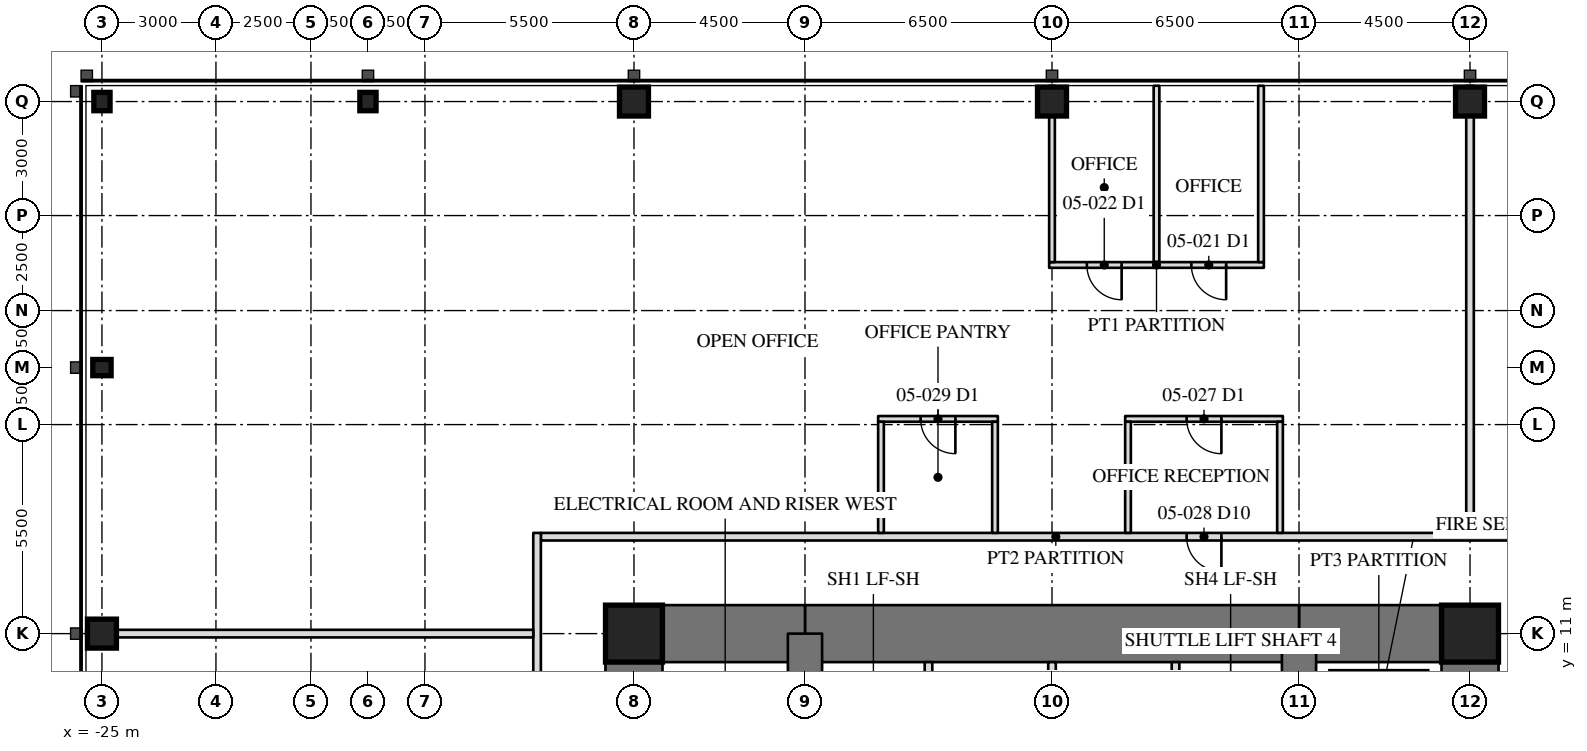
"""IFC4 building model, lengths in metres.
Left out: names, types, materials, properties, quantities, classifications, styles, units other than length and angle.
Written with IfcOpenShell. Run it as: python <this file> out.ifc"""

import sys

from ifc_helpers import new_model, si_unit, direction, frame, frame_2d, origin, origin_2d, place, context, subcontext, project, spatial, rectangle, hollow_rectangle, i_section, extrude, element, fill, save


model = new_model("IFC4")
c1 = context("Model", 3, precision=1e-05, world=origin(), true_north=direction((0.0, 1.0)))
c2 = subcontext(c1, "Body", "Model", "MODEL_VIEW")
j1 = project(units=[si_unit("LENGTHUNIT", "METRE"), si_unit("PLANEANGLEUNIT", "RADIAN")], contexts=[c1])
p1 = place(None, origin())
s1 = spatial("IfcSite", under=j1, at=p1, CompositionType="ELEMENT")
p2 = place(p1, origin())
s2 = spatial("IfcBuilding", under=s1, at=p2, CompositionType="ELEMENT")
p3 = place(p2, frame((0.0, 0.0, 24.2)))
s3 = spatial("IfcBuildingStorey", under=s2, at=p3, CompositionType="ELEMENT", Elevation=24.2)
for number, where, z_axis, x_axis in (
    (1, (11.0, 25.0, 0.0), (0.0, 0.0, 1.0), (1.0, 0.0, 0.0)),
    (2, (0.0, 25.0, 0.0), (0.0, 0.0, 1.0), (1.0, 0.0, 0.0)),
    (3, (-11.0, 25.0, 0.0), (0.0, 0.0, 1.0), (1.0, 0.0, 0.0)),
):
    element("IfcColumn", number, at=place(p3, frame(where, z_axis=z_axis, x_axis=x_axis)), inside=s3, PredefinedType="COLUMN", context=c2, shape_type="SweptSolid", body=[
        extrude(hollow_rectangle(XDim=0.762, YDim=0.762, WallThickness=0.127, at=origin_2d()), origin(), (0.0, 0.0, 1.0), 4.1),
    ])
for number, where, z_axis, x_axis in (
    (4, (-18.0, 25.0, 0.0), (0.0, 0.0, 1.0), (1.0, 0.0, 0.0)),
    (5, (-25.0, 25.0, 0.0), (0.0, 0.0, 1.0), (1.0, 0.0, 0.0)),
    (6, (-25.0, 18.0, 0.0), (0.0, 0.0, 1.0), (0.0, 1.0, 0.0)),
):
    element("IfcColumn", number, at=place(p3, frame(where, z_axis=z_axis, x_axis=x_axis)), inside=s3, PredefinedType="COLUMN", context=c2, shape_type="SweptSolid", body=[
        extrude(i_section(OverallWidth=0.427, OverallDepth=0.483, WebThickness=0.051, FlangeThickness=0.082, at=origin_2d()), origin(), (0.0, 0.0, 1.0), 4.1),
    ])
p4 = place(p3, frame((-25.0, 11.0, 0.0), z_axis=(0.0, 0.0, 1.0), x_axis=(0.0, 1.0, 0.0)))
e7 = element("IfcColumn", 7, at=p4, inside=s3, PredefinedType="COLUMN", context=c2, shape_type="SweptSolid", body=[
    extrude(hollow_rectangle(XDim=0.762, YDim=0.762, WallThickness=0.127, at=origin_2d()), origin(), (0.0, 0.0, 1.0), 4.1),
])
p5 = place(p3, frame((11.0, -11.0, 0.0), z_axis=(0.0, 0.0, 1.0), x_axis=(0.0, 1.0, 0.0)))
e8 = element("IfcWall", 8, at=p5, inside=s3, PredefinedType="SHEAR", context=c2, shape_type="SweptSolid", body=[
    extrude(rectangle(XDim=22.0, YDim=1.5, at=frame_2d((11.0, 0.0))), origin(), (0.0, 0.0, 1.0), 4.1),
])
p6 = place(p5, frame((15.393, 0.0, 0.0)))
e9 = element("IfcOpeningElement", 9, at=p6, cuts=e8, PredefinedType="OPENING", context=c2, shape_type="SweptSolid", body=[
    extrude(rectangle(XDim=0.915, YDim=2.134, at=frame_2d((0.458, 1.067))), frame((0.0, 0.76, 0.0), z_axis=(0.0, -1.0, 0.0), x_axis=(1.0, 0.0, 0.0)), (0.0, 0.0, 1.0), 1.52),
])
p7 = place(p3, frame((-11.0, 11.0, 0.0), z_axis=(0.0, 0.0, 1.0), x_axis=(0.0, -1.0, 0.0)))
e10 = element("IfcWall", 10, at=p7, inside=s3, PredefinedType="SHEAR", context=c2, shape_type="SweptSolid", body=[
    extrude(rectangle(XDim=22.0, YDim=1.5, at=frame_2d((11.0, 0.0))), origin(), (0.0, 0.0, 1.0), 4.1),
])
p8 = place(p7, frame((15.393, 0.0, 0.0)))
e11 = element("IfcOpeningElement", 11, at=p8, cuts=e10, PredefinedType="OPENING", context=c2, shape_type="SweptSolid", body=[
    extrude(rectangle(XDim=0.915, YDim=2.134, at=frame_2d((0.458, 1.067))), frame((0.0, 0.76, 0.0), z_axis=(0.0, -1.0, 0.0), x_axis=(1.0, 0.0, 0.0)), (0.0, 0.0, 1.0), 1.52),
])
p9 = place(p3, frame((11.0, 11.0, 0.0), z_axis=(0.0, 0.0, 1.0), x_axis=(-1.0, 0.0, 0.0)))
e12 = element("IfcWall", 12, at=p9, inside=s3, PredefinedType="SHEAR", context=c2, shape_type="SweptSolid", body=[
    extrude(rectangle(XDim=4.5, YDim=1.5, at=frame_2d((2.25, 0.0))), origin(), (0.0, 0.0, 1.0), 4.1),
])
p10 = place(p3, frame((6.5, 11.0, 0.0), z_axis=(0.0, 0.0, 1.0), x_axis=(-1.0, 0.0, 0.0)))
e13 = element("IfcWall", 13, at=p10, inside=s3, PredefinedType="SHEAR", context=c2, shape_type="SweptSolid", body=[
    extrude(rectangle(XDim=13.0, YDim=1.5, at=frame_2d((6.5, 0.0))), origin(), (0.0, 0.0, 1.0), 4.1),
])
p11 = place(p3, frame((-6.5, 11.0, 0.0), z_axis=(0.0, 0.0, 1.0), x_axis=(-1.0, 0.0, 0.0)))
e14 = element("IfcWall", 14, at=p11, inside=s3, PredefinedType="SHEAR", context=c2, shape_type="SweptSolid", body=[
    extrude(rectangle(XDim=4.5, YDim=1.5, at=frame_2d((2.25, 0.0))), origin(), (0.0, 0.0, 1.0), 4.1),
])
for number, where, z_axis, x_axis in (
    (15, (6.5, 6.5, 0.0), (0.0, 0.0, 1.0), (0.0, 1.0, 0.0)),
    (16, (-6.5, 11.0, 0.0), (0.0, 0.0, 1.0), (0.0, -1.0, 0.0)),
):
    element("IfcWall", number, at=place(p3, frame(where, z_axis=z_axis, x_axis=x_axis)), inside=s3, PredefinedType="SHEAR", context=c2, shape_type="SweptSolid", body=[
        extrude(rectangle(XDim=4.5, YDim=0.9, at=frame_2d((2.25, 0.0))), origin(), (0.0, 0.0, 1.0), 4.1),
    ])
for number, where, z_axis, x_axis in (
    (17, (11.0, 11.0, 0.0), (0.0, 0.0, 1.0), (1.0, 0.0, 0.0)),
    (18, (-11.0, 11.0, 0.0), (0.0, 0.0, 1.0), (1.0, 0.0, 0.0)),
):
    element("IfcColumn", number, at=place(p3, frame(where, z_axis=z_axis, x_axis=x_axis)), inside=s3, PredefinedType="COLUMN", context=c2, shape_type="SweptSolid", body=[
        extrude(hollow_rectangle(XDim=1.499, YDim=1.499, WallThickness=0.102, at=origin_2d()), origin(), (0.0, 0.0, 1.0), 4.1),
    ])
for number, where, z_axis, x_axis in (
    (19, (-3.25, 6.95, 0.0), (0.0, 0.0, 1.0), (0.0, 1.0, 0.0)),
    (20, (0.0, 6.95, 0.0), (0.0, 0.0, 1.0), (0.0, 1.0, 0.0)),
    (21, (3.25, 6.95, 0.0), (0.0, 0.0, 1.0), (0.0, 1.0, 0.0)),
):
    element("IfcWall", number, at=place(p3, frame(where, z_axis=z_axis, x_axis=x_axis)), inside=s3, PredefinedType="PARTITIONING", context=c2, shape_type="SweptSolid", body=[
        extrude(rectangle(XDim=3.3, YDim=0.2, at=frame_2d((1.65, 0.0))), origin(), (0.0, 0.0, 1.0), 3.91),
    ])
p12 = place(p3, frame((13.65, 13.55, 0.0), z_axis=(0.0, 0.0, 1.0), x_axis=(-1.0, 0.0, 0.0)))
e22 = element("IfcWall", 22, at=p12, inside=s3, PredefinedType="PARTITIONING", context=c2, shape_type="SweptSolid", body=[
    extrude(rectangle(XDim=27.1, YDim=0.2, at=frame_2d((13.55, 0.0))), origin(), (0.0, 0.0, 1.0), 3.91),
])
p13 = place(p12, frame((9.192, 0.0, 0.0)))
e23 = element("IfcOpeningElement", 23, at=p13, cuts=e22, PredefinedType="OPENING", context=c2, shape_type="SweptSolid", body=[
    extrude(rectangle(XDim=0.915, YDim=2.134, at=frame_2d((0.458, 1.067))), frame((0.0, 0.11, 0.0), z_axis=(0.0, -1.0, 0.0), x_axis=(1.0, 0.0, 0.0)), (0.0, 0.0, 1.0), 0.22),
])
p14 = place(p3, frame((-13.55, 13.65, 0.0), z_axis=(0.0, 0.0, 1.0), x_axis=(0.0, -1.0, 0.0)))
e24 = element("IfcWall", 24, at=p14, inside=s3, PredefinedType="PARTITIONING", context=c2, shape_type="SweptSolid", body=[
    extrude(rectangle(XDim=27.1, YDim=0.2, at=frame_2d((13.55, 0.0))), origin(), (0.0, 0.0, 1.0), 3.91),
])
p15 = place(p14, frame((6.192, 0.0, 0.0)))
e25 = element("IfcOpeningElement", 25, at=p15, cuts=e24, PredefinedType="OPENING", context=c2, shape_type="SweptSolid", body=[
    extrude(rectangle(XDim=0.915, YDim=2.134, at=frame_2d((0.458, 1.067))), frame((0.0, 0.11, 0.0), z_axis=(0.0, -1.0, 0.0), x_axis=(1.0, 0.0, 0.0)), (0.0, 0.0, 1.0), 0.22),
])
for number, where, z_axis, x_axis in (
    (26, (11.0, 13.65, 0.0), (0.0, 0.0, 1.0), (0.0, 1.0, 0.0)),
    (27, (-13.65, 11.0, 0.0), (0.0, 0.0, 1.0), (-1.0, 0.0, 0.0)),
):
    element("IfcWall", number, at=place(p3, frame(where, z_axis=z_axis, x_axis=x_axis)), inside=s3, PredefinedType="PARTITIONING", context=c2, shape_type="SweptSolid", body=[
        extrude(rectangle(XDim=11.765, YDim=0.2, at=frame_2d((5.883, 0.0))), origin(), (0.0, 0.0, 1.0), 3.13),
    ])
p16 = place(p3, frame((5.575, 20.7, 0.0), z_axis=(0.0, 0.0, 1.0), x_axis=(-1.0, 0.0, 0.0)))
e28 = element("IfcWall", 28, at=p16, inside=s3, PredefinedType="PARTITIONING", context=c2, shape_type="SweptSolid", body=[
    extrude(rectangle(XDim=5.65, YDim=0.15, at=frame_2d((2.825, 0.0))), origin(), (0.0, 0.0, 1.0), 3.91),
])
p17 = place(p16, frame((0.992, 0.0, 0.0)))
e29 = element("IfcOpeningElement", 29, at=p17, cuts=e28, PredefinedType="OPENING", context=c2, shape_type="SweptSolid", body=[
    extrude(rectangle(XDim=0.915, YDim=2.134, at=frame_2d((0.458, 1.067))), frame((0.0, 0.085, 0.0), z_axis=(0.0, -1.0, 0.0), x_axis=(1.0, 0.0, 0.0)), (0.0, 0.0, 1.0), 0.17),
])
p18 = place(p16, frame((3.742, 0.0, 0.0)))
e30 = element("IfcOpeningElement", 30, at=p18, cuts=e28, PredefinedType="OPENING", context=c2, shape_type="SweptSolid", body=[
    extrude(rectangle(XDim=0.915, YDim=2.134, at=frame_2d((0.458, 1.067))), frame((0.0, 0.085, 0.0), z_axis=(0.0, -1.0, 0.0), x_axis=(1.0, 0.0, 0.0)), (0.0, 0.0, 1.0), 0.17),
])
for number, where, z_axis, x_axis in (
    (31, (5.5, 20.775, 0.0), (0.0, 0.0, 1.0), (0.0, 1.0, 0.0)),
    (32, (2.75, 20.775, 0.0), (0.0, 0.0, 1.0), (0.0, 1.0, 0.0)),
):
    element("IfcWall", number, at=place(p3, frame(where, z_axis=z_axis, x_axis=x_axis)), inside=s3, PredefinedType="PARTITIONING", context=c2, shape_type="SweptSolid", body=[
        extrude(rectangle(XDim=4.64, YDim=0.15, at=frame_2d((2.32, 0.0))), origin(), (0.0, 0.0, 1.0), 3.91),
    ])
p19 = place(p3, frame((0.0, 20.775, 0.0), z_axis=(0.0, 0.0, 1.0), x_axis=(0.0, 1.0, 0.0)))
e33 = element("IfcWall", 33, at=p19, inside=s3, PredefinedType="PARTITIONING", context=c2, shape_type="SweptSolid", body=[
    extrude(rectangle(XDim=4.64, YDim=0.15, at=frame_2d((2.32, 0.0))), origin(), (0.0, 0.0, 1.0), 3.13),
])
p20 = place(p3, frame((6.075, 16.65, 0.0), z_axis=(0.0, 0.0, 1.0), x_axis=(-1.0, 0.0, 0.0)))
e34 = element("IfcWall", 34, at=p20, inside=s3, PredefinedType="PARTITIONING", context=c2, shape_type="SweptSolid", body=[
    extrude(rectangle(XDim=4.15, YDim=0.15, at=frame_2d((2.075, 0.0))), origin(), (0.0, 0.0, 1.0), 3.91),
])
p21 = place(p20, frame((1.617, 0.0, 0.0)))
e35 = element("IfcOpeningElement", 35, at=p21, cuts=e34, PredefinedType="OPENING", context=c2, shape_type="SweptSolid", body=[
    extrude(rectangle(XDim=0.915, YDim=2.134, at=frame_2d((0.458, 1.067))), frame((0.0, 0.085, 0.0), z_axis=(0.0, -1.0, 0.0), x_axis=(1.0, 0.0, 0.0)), (0.0, 0.0, 1.0), 0.17),
])
for number, where, z_axis, x_axis in (
    (36, (6.0, 16.575, 0.0), (0.0, 0.0, 1.0), (0.0, -1.0, 0.0)),
    (37, (2.0, 16.575, 0.0), (0.0, 0.0, 1.0), (0.0, -1.0, 0.0)),
):
    element("IfcWall", number, at=place(p3, frame(where, z_axis=z_axis, x_axis=x_axis)), inside=s3, PredefinedType="PARTITIONING", context=c2, shape_type="SweptSolid", body=[
        extrude(rectangle(XDim=2.925, YDim=0.15, at=frame_2d((1.462, 0.0))), origin(), (0.0, 0.0, 1.0), 3.91),
    ])
p22 = place(p3, frame((-1.425, 16.65, 0.0), z_axis=(0.0, 0.0, 1.0), x_axis=(-1.0, 0.0, 0.0)))
e38 = element("IfcWall", 38, at=p22, inside=s3, PredefinedType="PARTITIONING", context=c2, shape_type="SweptSolid", body=[
    extrude(rectangle(XDim=3.15, YDim=0.15, at=frame_2d((1.575, 0.0))), origin(), (0.0, 0.0, 1.0), 3.91),
])
p23 = place(p22, frame((1.117, 0.0, 0.0)))
e39 = element("IfcOpeningElement", 39, at=p23, cuts=e38, PredefinedType="OPENING", context=c2, shape_type="SweptSolid", body=[
    extrude(rectangle(XDim=0.915, YDim=2.134, at=frame_2d((0.458, 1.067))), frame((0.0, 0.085, 0.0), z_axis=(0.0, -1.0, 0.0), x_axis=(1.0, 0.0, 0.0)), (0.0, 0.0, 1.0), 0.17),
])
for number, where, z_axis, x_axis in (
    (40, (-1.5, 16.575, 0.0), (0.0, 0.0, 1.0), (0.0, -1.0, 0.0)),
    (41, (-4.5, 16.575, 0.0), (0.0, 0.0, 1.0), (0.0, -1.0, 0.0)),
):
    element("IfcWall", number, at=place(p3, frame(where, z_axis=z_axis, x_axis=x_axis)), inside=s3, PredefinedType="PARTITIONING", context=c2, shape_type="SweptSolid", body=[
        extrude(rectangle(XDim=2.925, YDim=0.15, at=frame_2d((1.462, 0.0))), origin(), (0.0, 0.0, 1.0), 3.91),
    ])
p24 = place(p17, origin())
e42 = element("IfcDoor", 42, at=p24, inside=s3, OperationType="SINGLE_SWING_LEFT", PredefinedType="DOOR", context=c2, shape_type="SweptSolid", body=[
    extrude(rectangle(XDim=0.915, YDim=2.134, at=frame_2d((0.458, 1.067))), frame((0.0, 0.025, 0.0), z_axis=(0.0, -1.0, 0.0), x_axis=(1.0, 0.0, 0.0)), (0.0, 0.0, 1.0), 0.05),
])
fill(e29, e42)
p25 = place(p18, origin())
e43 = element("IfcDoor", 43, at=p25, inside=s3, OperationType="SINGLE_SWING_LEFT", PredefinedType="DOOR", context=c2, shape_type="SweptSolid", body=[
    extrude(rectangle(XDim=0.915, YDim=2.134, at=frame_2d((0.458, 1.067))), frame((0.0, 0.025, 0.0), z_axis=(0.0, -1.0, 0.0), x_axis=(1.0, 0.0, 0.0)), (0.0, 0.0, 1.0), 0.05),
])
fill(e30, e43)
p26 = place(p21, origin())
e44 = element("IfcDoor", 44, at=p26, inside=s3, OperationType="SINGLE_SWING_LEFT", PredefinedType="DOOR", context=c2, shape_type="SweptSolid", body=[
    extrude(rectangle(XDim=0.915, YDim=2.134, at=frame_2d((0.458, 1.067))), frame((0.0, 0.025, 0.0), z_axis=(0.0, -1.0, 0.0), x_axis=(1.0, 0.0, 0.0)), (0.0, 0.0, 1.0), 0.05),
])
fill(e35, e44)
p27 = place(p13, origin())
e45 = element("IfcDoor", 45, at=p27, inside=s3, OperationType="SINGLE_SWING_LEFT", PredefinedType="DOOR", context=c2, shape_type="SweptSolid", body=[
    extrude(rectangle(XDim=0.915, YDim=2.134, at=frame_2d((0.458, 1.067))), frame((0.0, 0.025, 0.0), z_axis=(0.0, -1.0, 0.0), x_axis=(1.0, 0.0, 0.0)), (0.0, 0.0, 1.0), 0.05),
])
fill(e23, e45)
p28 = place(p23, origin())
e46 = element("IfcDoor", 46, at=p28, inside=s3, OperationType="SINGLE_SWING_LEFT", PredefinedType="DOOR", context=c2, shape_type="SweptSolid", body=[
    extrude(rectangle(XDim=0.915, YDim=2.134, at=frame_2d((0.458, 1.067))), frame((0.0, 0.025, 0.0), z_axis=(0.0, -1.0, 0.0), x_axis=(1.0, 0.0, 0.0)), (0.0, 0.0, 1.0), 0.05),
])
fill(e39, e46)
save(model, sys.argv[1])
